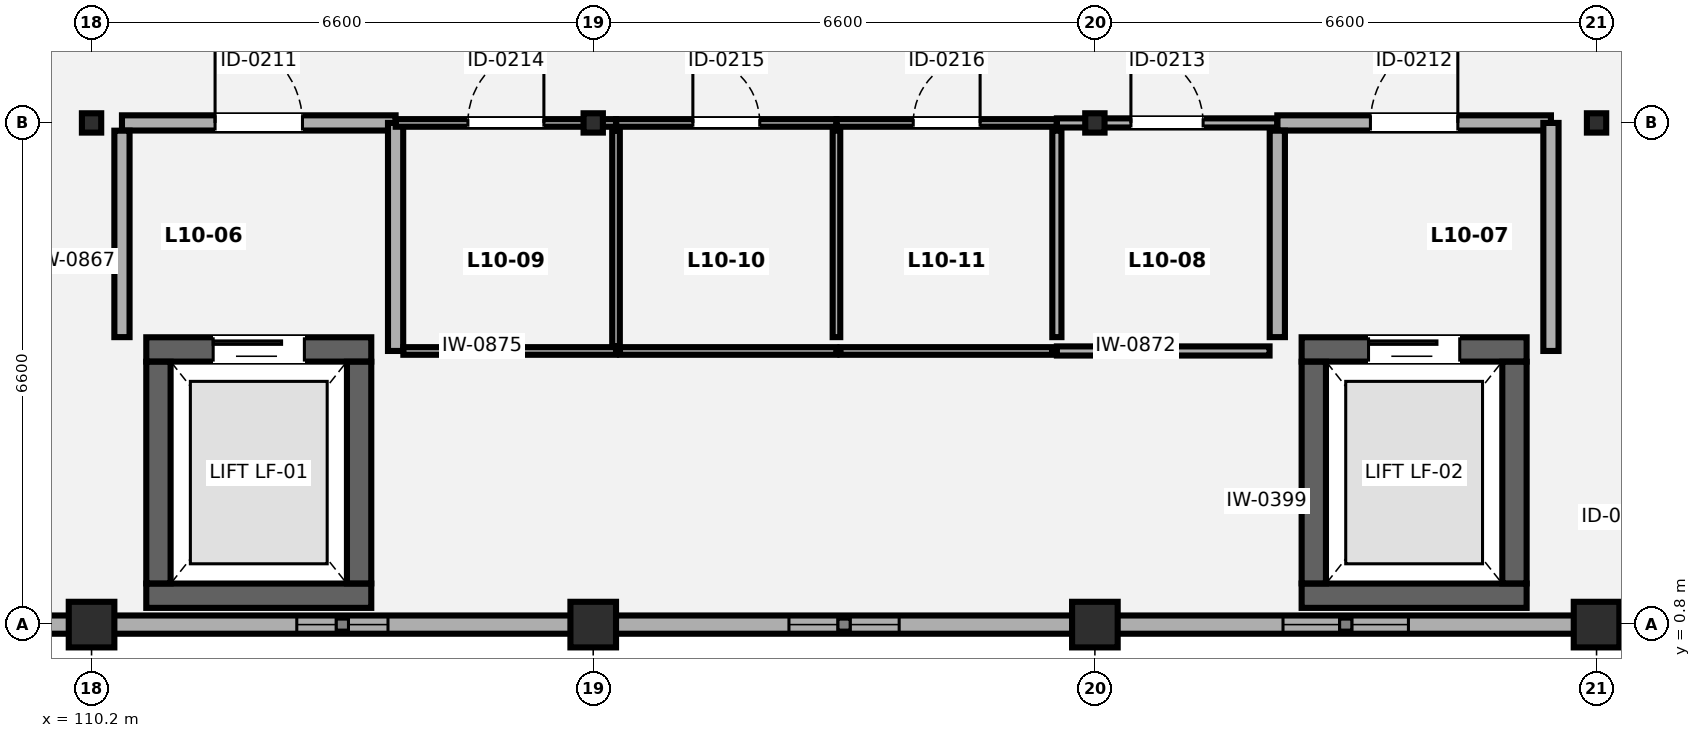
"""IFC4 building model, lengths in metres.
Left out: names, types, materials, properties, quantities, classifications, styles, units other than length and angle.
Written with IfcOpenShell. Run it as: python <this file> out.ifc"""

import sys

from ifc_helpers import new_model, si_unit, direction, frame, frame_2d, origin, origin_2d, place, context, subcontext, project, spatial, rectangle, circle, i_section, extrude, element, fill, save


model = new_model("IFC4")
c1 = context("Model", 3, precision=1e-05, world=origin(), true_north=direction((0.0, 1.0)))
c2 = subcontext(c1, "Body", "Model", "MODEL_VIEW")
j1 = project(units=[si_unit("LENGTHUNIT", "METRE"), si_unit("PLANEANGLEUNIT", "RADIAN")], contexts=[c1])
p1 = place(None, origin())
s1 = spatial("IfcSite", under=j1, at=p1, CompositionType="ELEMENT")
p2 = place(p1, origin())
s2 = spatial("IfcBuilding", under=s1, at=p2, CompositionType="ELEMENT")
p3 = place(p2, frame((0.0, 0.0, 42.0)))
s3 = spatial("IfcBuildingStorey", under=s2, at=p3, CompositionType="ELEMENT", Elevation=42.0)
p4 = place(p3, frame((110.2, 0.8, 0.0), z_axis=(0.0, 0.0, 1.0), x_axis=(1.0, 0.0, 0.0)))
e1 = element("IfcColumn", 1, at=p4, inside=s3, PredefinedType="PILASTER", context=c2, shape_type="SweptSolid", body=[
    extrude(circle(Radius=0.3, at=origin_2d()), origin(), (0.0, 0.0, 1.0), 3.85),
])
p5 = place(p3, frame((110.2, 7.4, 0.0), z_axis=(0.0, 0.0, 1.0), x_axis=(1.0, 0.0, 0.0)))
e2 = element("IfcColumn", 2, at=p5, inside=s3, PredefinedType="COLUMN", context=c2, shape_type="SweptSolid", body=[
    extrude(i_section(OverallWidth=0.254, OverallDepth=0.254, WebThickness=0.009, FlangeThickness=0.014, FilletRadius=0.014, at=origin_2d()), origin(), (0.0, 0.0, 1.0), 3.85),
])
p6 = place(p3, frame((116.8, 0.8, 0.0), z_axis=(0.0, 0.0, 1.0), x_axis=(1.0, 0.0, 0.0)))
e3 = element("IfcColumn", 3, at=p6, inside=s3, PredefinedType="PILASTER", context=c2, shape_type="SweptSolid", body=[
    extrude(circle(Radius=0.3, at=origin_2d()), origin(), (0.0, 0.0, 1.0), 3.85),
])
p7 = place(p3, frame((116.8, 7.4, 0.0), z_axis=(0.0, 0.0, 1.0), x_axis=(1.0, 0.0, 0.0)))
e4 = element("IfcColumn", 4, at=p7, inside=s3, PredefinedType="COLUMN", context=c2, shape_type="SweptSolid", body=[
    extrude(i_section(OverallWidth=0.254, OverallDepth=0.254, WebThickness=0.009, FlangeThickness=0.014, FilletRadius=0.014, at=origin_2d()), origin(), (0.0, 0.0, 1.0), 3.85),
])
p8 = place(p3, frame((123.4, 0.8, 0.0), z_axis=(0.0, 0.0, 1.0), x_axis=(1.0, 0.0, 0.0)))
e5 = element("IfcColumn", 5, at=p8, inside=s3, PredefinedType="PILASTER", context=c2, shape_type="SweptSolid", body=[
    extrude(circle(Radius=0.3, at=origin_2d()), origin(), (0.0, 0.0, 1.0), 3.85),
])
p9 = place(p3, frame((123.4, 7.4, 0.0), z_axis=(0.0, 0.0, 1.0), x_axis=(1.0, 0.0, 0.0)))
e6 = element("IfcColumn", 6, at=p9, inside=s3, PredefinedType="COLUMN", context=c2, shape_type="SweptSolid", body=[
    extrude(i_section(OverallWidth=0.254, OverallDepth=0.254, WebThickness=0.009, FlangeThickness=0.014, FilletRadius=0.014, at=origin_2d()), origin(), (0.0, 0.0, 1.0), 3.85),
])
p10 = place(p3, frame((130.0, 0.8, 0.0), z_axis=(0.0, 0.0, 1.0), x_axis=(1.0, 0.0, 0.0)))
e7 = element("IfcColumn", 7, at=p10, inside=s3, PredefinedType="PILASTER", context=c2, shape_type="SweptSolid", body=[
    extrude(circle(Radius=0.3, at=origin_2d()), origin(), (0.0, 0.0, 1.0), 3.85),
])
p11 = place(p3, frame((130.0, 7.4, 0.0), z_axis=(0.0, 0.0, 1.0), x_axis=(1.0, 0.0, 0.0)))
e8 = element("IfcColumn", 8, at=p11, inside=s3, PredefinedType="COLUMN", context=c2, shape_type="SweptSolid", body=[
    extrude(i_section(OverallWidth=0.254, OverallDepth=0.254, WebThickness=0.009, FlangeThickness=0.014, FilletRadius=0.014, at=origin_2d()), origin(), (0.0, 0.0, 1.0), 3.85),
])
p12 = place(p3, frame((136.302, 0.8, 0.0), z_axis=(0.0, 0.0, 1.0), x_axis=(-1.0, 0.0, 0.0)))
e9 = element("IfcWall", 9, at=p12, inside=s3, PredefinedType="SOLIDWALL", context=c2, shape_type="SweptSolid", body=[
    extrude(rectangle(XDim=32.404, YDim=0.24, at=frame_2d((16.202, 0.0))), origin(), (0.0, 0.0, 1.0), 3.155),
])
p13 = place(p12, frame((28.177, 0.0, 0.85)))
e10 = element("IfcOpeningElement", 10, at=p13, cuts=e9, PredefinedType="OPENING", context=c2, shape_type="SweptSolid", body=[
    extrude(rectangle(XDim=2.45, YDim=1.4, at=frame_2d((1.225, 0.7))), frame((0.0, 0.13, 0.0), z_axis=(0.0, -1.0, 0.0), x_axis=(1.0, 0.0, 0.0)), (0.0, 0.0, 1.0), 0.26),
])
p14 = place(p12, frame((22.202, 0.0, 0.85)))
e11 = element("IfcOpeningElement", 11, at=p14, cuts=e9, PredefinedType="OPENING", context=c2, shape_type="SweptSolid", body=[
    extrude(rectangle(XDim=1.2, YDim=1.25, at=frame_2d((0.6, 0.625))), frame((0.0, 0.13, 0.0), z_axis=(0.0, -1.0, 0.0), x_axis=(1.0, 0.0, 0.0)), (0.0, 0.0, 1.0), 0.26),
])
p15 = place(p12, frame((15.477, 0.0, 0.85)))
e12 = element("IfcOpeningElement", 12, at=p15, cuts=e9, PredefinedType="OPENING", context=c2, shape_type="SweptSolid", body=[
    extrude(rectangle(XDim=1.45, YDim=1.25, at=frame_2d((0.725, 0.625))), frame((0.0, 0.13, 0.0), z_axis=(0.0, -1.0, 0.0), x_axis=(1.0, 0.0, 0.0)), (0.0, 0.0, 1.0), 0.26),
])
p16 = place(p12, frame((8.777, 0.0, 0.85)))
e13 = element("IfcOpeningElement", 13, at=p16, cuts=e9, PredefinedType="OPENING", context=c2, shape_type="SweptSolid", body=[
    extrude(rectangle(XDim=1.65, YDim=1.25, at=frame_2d((0.825, 0.625))), frame((0.0, 0.13, 0.0), z_axis=(0.0, -1.0, 0.0), x_axis=(1.0, 0.0, 0.0)), (0.0, 0.0, 1.0), 0.26),
])
p17 = place(p12, frame((2.052, 0.0, 0.85)))
e14 = element("IfcOpeningElement", 14, at=p17, cuts=e9, PredefinedType="OPENING", context=c2, shape_type="SweptSolid", body=[
    extrude(rectangle(XDim=1.9, YDim=1.25, at=frame_2d((0.95, 0.625))), frame((0.0, 0.13, 0.0), z_axis=(0.0, -1.0, 0.0), x_axis=(1.0, 0.0, 0.0)), (0.0, 0.0, 1.0), 0.26),
])
p18 = place(p3, frame((110.92, 1.18, 0.0), z_axis=(0.0, 0.0, 1.0), x_axis=(1.0, 0.0, 0.0)))
e15 = element("IfcWall", 15, at=p18, inside=s3, PredefinedType="SHEAR", context=c2, shape_type="SweptSolid", body=[
    extrude(rectangle(XDim=2.96, YDim=0.32, at=frame_2d((1.48, 0.0))), origin(), (0.0, 0.0, 1.0), 3.67),
])
p19 = place(p3, frame((110.92, 4.42, 0.0), z_axis=(0.0, 0.0, 1.0), x_axis=(1.0, 0.0, 0.0)))
e16 = element("IfcWall", 16, at=p19, inside=s3, PredefinedType="SHEAR", context=c2, shape_type="SweptSolid", body=[
    extrude(rectangle(XDim=2.96, YDim=0.32, at=frame_2d((1.48, 0.0))), origin(), (0.0, 0.0, 1.0), 3.67),
])
p20 = place(p19, frame((0.88, 0.0, 0.0)))
e17 = element("IfcOpeningElement", 17, at=p20, cuts=e16, PredefinedType="OPENING", context=c2, shape_type="SweptSolid", body=[
    extrude(rectangle(XDim=1.2, YDim=2.2, at=frame_2d((0.6, 1.1))), frame((0.0, 0.17, 0.0), z_axis=(0.0, -1.0, 0.0), x_axis=(1.0, 0.0, 0.0)), (0.0, 0.0, 1.0), 0.34),
])
for number, where, z_axis, x_axis in (
    (18, (111.08, 1.342, 0.0), (0.0, 0.0, 1.0), (0.0, 1.0, 0.0)),
    (19, (113.72, 1.342, 0.0), (0.0, 0.0, 1.0), (0.0, 1.0, 0.0)),
):
    element("IfcWall", number, at=place(p3, frame(where, z_axis=z_axis, x_axis=x_axis)), inside=s3, PredefinedType="SHEAR", context=c2, shape_type="SweptSolid", body=[
        extrude(rectangle(XDim=2.916, YDim=0.32, at=frame_2d((1.458, 0.0))), origin(), (0.0, 0.0, 1.0), 3.67),
    ])
p21 = place(p3, frame((126.12, 1.18, 0.0), z_axis=(0.0, 0.0, 1.0), x_axis=(1.0, 0.0, 0.0)))
e20 = element("IfcWall", 20, at=p21, inside=s3, PredefinedType="SHEAR", context=c2, shape_type="SweptSolid", body=[
    extrude(rectangle(XDim=2.96, YDim=0.32, at=frame_2d((1.48, 0.0))), origin(), (0.0, 0.0, 1.0), 3.67),
])
p22 = place(p3, frame((126.12, 4.42, 0.0), z_axis=(0.0, 0.0, 1.0), x_axis=(1.0, 0.0, 0.0)))
e21 = element("IfcWall", 21, at=p22, inside=s3, PredefinedType="SHEAR", context=c2, shape_type="SweptSolid", body=[
    extrude(rectangle(XDim=2.96, YDim=0.32, at=frame_2d((1.48, 0.0))), origin(), (0.0, 0.0, 1.0), 3.67),
])
p23 = place(p22, frame((0.88, 0.0, 0.0)))
e22 = element("IfcOpeningElement", 22, at=p23, cuts=e21, PredefinedType="OPENING", context=c2, shape_type="SweptSolid", body=[
    extrude(rectangle(XDim=1.2, YDim=2.2, at=frame_2d((0.6, 1.1))), frame((0.0, 0.17, 0.0), z_axis=(0.0, -1.0, 0.0), x_axis=(1.0, 0.0, 0.0)), (0.0, 0.0, 1.0), 0.34),
])
for number, where, z_axis, x_axis in (
    (23, (126.28, 1.342, 0.0), (0.0, 0.0, 1.0), (0.0, 1.0, 0.0)),
    (24, (128.92, 1.342, 0.0), (0.0, 0.0, 1.0), (0.0, 1.0, 0.0)),
):
    element("IfcWall", number, at=place(p3, frame(where, z_axis=z_axis, x_axis=x_axis)), inside=s3, PredefinedType="SHEAR", context=c2, shape_type="SweptSolid", body=[
        extrude(rectangle(XDim=2.916, YDim=0.32, at=frame_2d((1.458, 0.0))), origin(), (0.0, 0.0, 1.0), 3.67),
    ])
p24 = place(p3, frame((110.6, 7.4, 0.0), z_axis=(0.0, 0.0, 1.0), x_axis=(1.0, 0.0, 0.0)))
e25 = element("IfcWall", 25, at=p24, inside=s3, PredefinedType="SOLIDWALL", context=c2, shape_type="SweptSolid", body=[
    extrude(rectangle(XDim=3.6, YDim=0.2, at=frame_2d((1.8, 0.0))), origin(), (0.0, 0.0, 1.0), 2.943),
])
p25 = place(p24, frame((1.225, 0.0, 0.0)))
e26 = element("IfcOpeningElement", 26, at=p25, cuts=e25, PredefinedType="OPENING", context=c2, shape_type="SweptSolid", body=[
    extrude(rectangle(XDim=1.15, YDim=2.15, at=frame_2d((0.575, 1.075))), frame((0.0, 0.11, 0.0), z_axis=(0.0, -1.0, 0.0), x_axis=(1.0, 0.0, 0.0)), (0.0, 0.0, 1.0), 0.22),
])
p26 = place(p3, frame((110.6, 4.582, 0.0), z_axis=(0.0, 0.0, 1.0), x_axis=(0.0, 1.0, 0.0)))
e27 = element("IfcWall", 27, at=p26, inside=s3, PredefinedType="SOLIDWALL", context=c2, shape_type="SweptSolid", body=[
    extrude(rectangle(XDim=2.716, YDim=0.2, at=frame_2d((1.358, 0.0))), origin(), (0.0, 0.0, 1.0), 3.67),
])
p27 = place(p3, frame((114.2, 4.4, 0.0), z_axis=(0.0, 0.0, 1.0), x_axis=(0.0, 1.0, 0.0)))
e28 = element("IfcWall", 28, at=p27, inside=s3, PredefinedType="SOLIDWALL", context=c2, shape_type="SweptSolid", body=[
    extrude(rectangle(XDim=3.0, YDim=0.2, at=frame_2d((1.5, 0.0))), origin(), (0.0, 0.0, 1.0), 3.67),
])
p28 = place(p3, frame((125.8, 7.4, 0.0), z_axis=(0.0, 0.0, 1.0), x_axis=(1.0, 0.0, 0.0)))
e29 = element("IfcWall", 29, at=p28, inside=s3, PredefinedType="SOLIDWALL", context=c2, shape_type="SweptSolid", body=[
    extrude(rectangle(XDim=3.6, YDim=0.2, at=frame_2d((1.8, 0.0))), origin(), (0.0, 0.0, 1.0), 2.943),
])
p29 = place(p28, frame((1.225, 0.0, 0.0)))
e30 = element("IfcOpeningElement", 30, at=p29, cuts=e29, PredefinedType="OPENING", context=c2, shape_type="SweptSolid", body=[
    extrude(rectangle(XDim=1.15, YDim=2.15, at=frame_2d((0.575, 1.075))), frame((0.0, 0.11, 0.0), z_axis=(0.0, -1.0, 0.0), x_axis=(1.0, 0.0, 0.0)), (0.0, 0.0, 1.0), 0.22),
])
p30 = place(p3, frame((125.8, 4.582, 0.0), z_axis=(0.0, 0.0, 1.0), x_axis=(0.0, 1.0, 0.0)))
e31 = element("IfcWall", 31, at=p30, inside=s3, PredefinedType="SOLIDWALL", context=c2, shape_type="SweptSolid", body=[
    extrude(rectangle(XDim=2.716, YDim=0.2, at=frame_2d((1.358, 0.0))), origin(), (0.0, 0.0, 1.0), 3.67),
])
p31 = place(p3, frame((129.4, 4.4, 0.0), z_axis=(0.0, 0.0, 1.0), x_axis=(0.0, 1.0, 0.0)))
e32 = element("IfcWall", 32, at=p31, inside=s3, PredefinedType="SOLIDWALL", context=c2, shape_type="SweptSolid", body=[
    extrude(rectangle(XDim=3.0, YDim=0.2, at=frame_2d((1.5, 0.0))), origin(), (0.0, 0.0, 1.0), 3.67),
])
p32 = place(p3, frame((122.9, 4.4, 0.0), z_axis=(0.0, 0.0, 1.0), x_axis=(1.0, 0.0, 0.0)))
e33 = element("IfcWall", 33, at=p32, inside=s3, PredefinedType="PARTITIONING", context=c2, shape_type="SweptSolid", body=[
    extrude(rectangle(XDim=2.798, YDim=0.12, at=frame_2d((1.399, 0.0))), origin(), (0.0, 0.0, 1.0), 3.67),
])
p33 = place(p3, frame((122.9, 7.4, 0.0), z_axis=(0.0, 0.0, 1.0), x_axis=(1.0, 0.0, 0.0)))
e34 = element("IfcWall", 34, at=p33, inside=s3, PredefinedType="PARTITIONING", context=c2, shape_type="SweptSolid", body=[
    extrude(rectangle(XDim=2.898, YDim=0.12, at=frame_2d((1.449, 0.0))), origin(), (0.0, 0.0, 1.0), 2.943),
])
p34 = place(p33, frame((0.974, 0.0, 0.0)))
e35 = element("IfcOpeningElement", 35, at=p34, cuts=e34, PredefinedType="OPENING", context=c2, shape_type="SweptSolid", body=[
    extrude(rectangle(XDim=0.95, YDim=2.1, at=frame_2d((0.475, 1.05))), frame((0.0, 0.07, 0.0), z_axis=(0.0, -1.0, 0.0), x_axis=(1.0, 0.0, 0.0)), (0.0, 0.0, 1.0), 0.14),
])
p35 = place(p3, frame((122.9, 4.582, 0.0), z_axis=(0.0, 0.0, 1.0), x_axis=(0.0, 1.0, 0.0)))
e36 = element("IfcWall", 36, at=p35, inside=s3, PredefinedType="PARTITIONING", context=c2, shape_type="SweptSolid", body=[
    extrude(rectangle(XDim=2.716, YDim=0.12, at=frame_2d((1.358, 0.0))), origin(), (0.0, 0.0, 1.0), 3.67),
])
p36 = place(p3, frame((114.302, 4.4, 0.0), z_axis=(0.0, 0.0, 1.0), x_axis=(1.0, 0.0, 0.0)))
e37 = element("IfcWall", 37, at=p36, inside=s3, PredefinedType="PARTITIONING", context=c2, shape_type="SweptSolid", body=[
    extrude(rectangle(XDim=2.798, YDim=0.1, at=frame_2d((1.399, 0.0))), origin(), (0.0, 0.0, 1.0), 3.67),
])
p37 = place(p3, frame((114.202, 7.4, 0.0), z_axis=(0.0, 0.0, 1.0), x_axis=(1.0, 0.0, 0.0)))
e38 = element("IfcWall", 38, at=p37, inside=s3, PredefinedType="PARTITIONING", context=c2, shape_type="SweptSolid", body=[
    extrude(rectangle(XDim=2.898, YDim=0.1, at=frame_2d((1.449, 0.0))), origin(), (0.0, 0.0, 1.0), 2.943),
])
p38 = place(p37, frame((0.949, 0.0, 0.0)))
e39 = element("IfcOpeningElement", 39, at=p38, cuts=e38, PredefinedType="OPENING", context=c2, shape_type="SweptSolid", body=[
    extrude(rectangle(XDim=1.0, YDim=2.1, at=frame_2d((0.5, 1.05))), frame((0.0, 0.06, 0.0), z_axis=(0.0, -1.0, 0.0), x_axis=(1.0, 0.0, 0.0)), (0.0, 0.0, 1.0), 0.12),
])
p39 = place(p3, frame((117.1, 4.462, 0.0), z_axis=(0.0, 0.0, 1.0), x_axis=(0.0, 1.0, 0.0)))
e40 = element("IfcWall", 40, at=p39, inside=s3, PredefinedType="PARTITIONING", context=c2, shape_type="SweptSolid", body=[
    extrude(rectangle(XDim=2.836, YDim=0.1, at=frame_2d((1.418, 0.0))), origin(), (0.0, 0.0, 1.0), 3.67),
])
p40 = place(p3, frame((117.152, 4.4, 0.0), z_axis=(0.0, 0.0, 1.0), x_axis=(1.0, 0.0, 0.0)))
e41 = element("IfcWall", 41, at=p40, inside=s3, PredefinedType="PARTITIONING", context=c2, shape_type="SweptSolid", body=[
    extrude(rectangle(XDim=2.848, YDim=0.1, at=frame_2d((1.424, 0.0))), origin(), (0.0, 0.0, 1.0), 3.67),
])
p41 = place(p3, frame((117.102, 7.4, 0.0), z_axis=(0.0, 0.0, 1.0), x_axis=(1.0, 0.0, 0.0)))
e42 = element("IfcWall", 42, at=p41, inside=s3, PredefinedType="PARTITIONING", context=c2, shape_type="SweptSolid", body=[
    extrude(rectangle(XDim=2.898, YDim=0.1, at=frame_2d((1.449, 0.0))), origin(), (0.0, 0.0, 1.0), 2.943),
])
p42 = place(p41, frame((1.009, 0.0, 0.0)))
e43 = element("IfcOpeningElement", 43, at=p42, cuts=e42, PredefinedType="OPENING", context=c2, shape_type="SweptSolid", body=[
    extrude(rectangle(XDim=0.88, YDim=2.08, at=frame_2d((0.44, 1.04))), frame((0.0, 0.06, 0.0), z_axis=(0.0, -1.0, 0.0), x_axis=(1.0, 0.0, 0.0)), (0.0, 0.0, 1.0), 0.12),
])
p43 = place(p3, frame((120.0, 4.582, 0.0), z_axis=(0.0, 0.0, 1.0), x_axis=(0.0, 1.0, 0.0)))
e44 = element("IfcWall", 44, at=p43, inside=s3, PredefinedType="PARTITIONING", context=c2, shape_type="SweptSolid", body=[
    extrude(rectangle(XDim=2.716, YDim=0.1, at=frame_2d((1.358, 0.0))), origin(), (0.0, 0.0, 1.0), 3.67),
])
p44 = place(p3, frame((120.052, 4.4, 0.0), z_axis=(0.0, 0.0, 1.0), x_axis=(1.0, 0.0, 0.0)))
e45 = element("IfcWall", 45, at=p44, inside=s3, PredefinedType="PARTITIONING", context=c2, shape_type="SweptSolid", body=[
    extrude(rectangle(XDim=2.786, YDim=0.1, at=frame_2d((1.393, 0.0))), origin(), (0.0, 0.0, 1.0), 3.67),
])
p45 = place(p3, frame((120.002, 7.4, 0.0), z_axis=(0.0, 0.0, 1.0), x_axis=(1.0, 0.0, 0.0)))
e46 = element("IfcWall", 46, at=p45, inside=s3, PredefinedType="PARTITIONING", context=c2, shape_type="SweptSolid", body=[
    extrude(rectangle(XDim=2.896, YDim=0.1, at=frame_2d((1.448, 0.0))), origin(), (0.0, 0.0, 1.0), 2.943),
])
p46 = place(p45, frame((1.008, 0.0, 0.0)))
e47 = element("IfcOpeningElement", 47, at=p46, cuts=e46, PredefinedType="OPENING", context=c2, shape_type="SweptSolid", body=[
    extrude(rectangle(XDim=0.88, YDim=2.08, at=frame_2d((0.44, 1.04))), frame((0.0, 0.06, 0.0), z_axis=(0.0, -1.0, 0.0), x_axis=(1.0, 0.0, 0.0)), (0.0, 0.0, 1.0), 0.12),
])
p47 = place(p14, origin())
e48 = element("IfcWindow", 48, at=p47, inside=s3, PartitioningType="SINGLE_PANEL", PredefinedType="WINDOW", context=c2, shape_type="SweptSolid", body=[
    extrude(rectangle(XDim=1.2, YDim=1.25, at=frame_2d((0.6, 0.625))), frame((0.0, 0.03, 0.0), z_axis=(0.0, -1.0, 0.0), x_axis=(1.0, 0.0, 0.0)), (0.0, 0.0, 1.0), 0.06),
])
fill(e11, e48)
p48 = place(p15, origin())
e49 = element("IfcWindow", 49, at=p48, inside=s3, PartitioningType="SINGLE_PANEL", PredefinedType="WINDOW", context=c2, shape_type="SweptSolid", body=[
    extrude(rectangle(XDim=1.45, YDim=1.25, at=frame_2d((0.725, 0.625))), frame((0.0, 0.03, 0.0), z_axis=(0.0, -1.0, 0.0), x_axis=(1.0, 0.0, 0.0)), (0.0, 0.0, 1.0), 0.06),
])
fill(e12, e49)
p49 = place(p16, origin())
e50 = element("IfcWindow", 50, at=p49, inside=s3, PartitioningType="SINGLE_PANEL", PredefinedType="WINDOW", context=c2, shape_type="SweptSolid", body=[
    extrude(rectangle(XDim=1.65, YDim=1.25, at=frame_2d((0.825, 0.625))), frame((0.0, 0.03, 0.0), z_axis=(0.0, -1.0, 0.0), x_axis=(1.0, 0.0, 0.0)), (0.0, 0.0, 1.0), 0.06),
])
fill(e13, e50)
p50 = place(p20, origin())
e51 = element("IfcDoor", 51, at=p50, inside=s3, OperationType="SLIDING_TO_LEFT", PredefinedType="DOOR", context=c2, shape_type="SweptSolid", body=[
    extrude(rectangle(XDim=1.2, YDim=2.2, at=frame_2d((0.6, 1.1))), frame((0.0, 0.025, 0.0), z_axis=(0.0, -1.0, 0.0), x_axis=(1.0, 0.0, 0.0)), (0.0, 0.0, 1.0), 0.05),
])
fill(e17, e51)
p51 = place(p23, origin())
e52 = element("IfcDoor", 52, at=p51, inside=s3, OperationType="SLIDING_TO_LEFT", PredefinedType="DOOR", context=c2, shape_type="SweptSolid", body=[
    extrude(rectangle(XDim=1.2, YDim=2.2, at=frame_2d((0.6, 1.1))), frame((0.0, 0.025, 0.0), z_axis=(0.0, -1.0, 0.0), x_axis=(1.0, 0.0, 0.0)), (0.0, 0.0, 1.0), 0.05),
])
fill(e22, e52)
p52 = place(p25, origin())
e53 = element("IfcDoor", 53, at=p52, inside=s3, OperationType="SINGLE_SWING_LEFT", PredefinedType="DOOR", context=c2, shape_type="SweptSolid", body=[
    extrude(rectangle(XDim=1.15, YDim=2.15, at=frame_2d((0.575, 1.075))), frame((0.0, 0.025, 0.0), z_axis=(0.0, -1.0, 0.0), x_axis=(1.0, 0.0, 0.0)), (0.0, 0.0, 1.0), 0.05),
])
fill(e26, e53)
p53 = place(p29, origin())
e54 = element("IfcDoor", 54, at=p53, inside=s3, OperationType="SINGLE_SWING_RIGHT", PredefinedType="DOOR", context=c2, shape_type="SweptSolid", body=[
    extrude(rectangle(XDim=1.15, YDim=2.15, at=frame_2d((0.575, 1.075))), frame((0.0, 0.025, 0.0), z_axis=(0.0, -1.0, 0.0), x_axis=(1.0, 0.0, 0.0)), (0.0, 0.0, 1.0), 0.05),
])
fill(e30, e54)
p54 = place(p34, origin())
e55 = element("IfcDoor", 55, at=p54, inside=s3, OperationType="SINGLE_SWING_LEFT", PredefinedType="DOOR", context=c2, shape_type="SweptSolid", body=[
    extrude(rectangle(XDim=0.95, YDim=2.1, at=frame_2d((0.475, 1.05))), frame((0.0, 0.025, 0.0), z_axis=(0.0, -1.0, 0.0), x_axis=(1.0, 0.0, 0.0)), (0.0, 0.0, 1.0), 0.05),
])
fill(e35, e55)
p55 = place(p38, origin())
e56 = element("IfcDoor", 56, at=p55, inside=s3, OperationType="SINGLE_SWING_RIGHT", PredefinedType="DOOR", context=c2, shape_type="SweptSolid", body=[
    extrude(rectangle(XDim=1.0, YDim=2.1, at=frame_2d((0.5, 1.05))), frame((0.0, 0.025, 0.0), z_axis=(0.0, -1.0, 0.0), x_axis=(1.0, 0.0, 0.0)), (0.0, 0.0, 1.0), 0.05),
])
fill(e39, e56)
p56 = place(p42, origin())
e57 = element("IfcDoor", 57, at=p56, inside=s3, OperationType="SINGLE_SWING_LEFT", PredefinedType="DOOR", context=c2, shape_type="SweptSolid", body=[
    extrude(rectangle(XDim=0.88, YDim=2.08, at=frame_2d((0.44, 1.04))), frame((0.0, 0.025, 0.0), z_axis=(0.0, -1.0, 0.0), x_axis=(1.0, 0.0, 0.0)), (0.0, 0.0, 1.0), 0.05),
])
fill(e43, e57)
p57 = place(p46, origin())
e58 = element("IfcDoor", 58, at=p57, inside=s3, OperationType="SINGLE_SWING_RIGHT", PredefinedType="DOOR", context=c2, shape_type="SweptSolid", body=[
    extrude(rectangle(XDim=0.88, YDim=2.08, at=frame_2d((0.44, 1.04))), frame((0.0, 0.025, 0.0), z_axis=(0.0, -1.0, 0.0), x_axis=(1.0, 0.0, 0.0)), (0.0, 0.0, 1.0), 0.05),
])
fill(e47, e58)
save(model, sys.argv[1])
